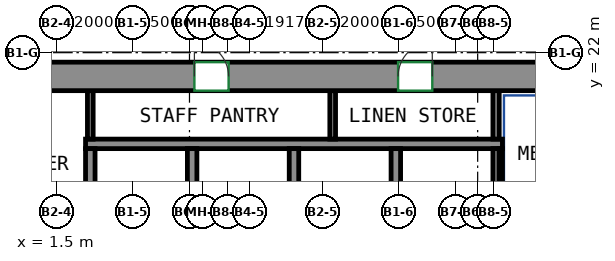
"""IFC4 building model, lengths in metres.
Left out: names, types, materials, properties, quantities, classifications, styles, units other than length and angle.
Written with IfcOpenShell. Run it as: python <this file> out.ifc"""

import sys

from ifc_helpers import new_model, si_unit, direction, frame, frame_2d, origin, place, context, subcontext, project, spatial, rectangle, extrude, source, transform, mapped, element, fill, save


model = new_model("IFC4")
c1 = context("Model", 3, precision=1e-05, world=origin(), true_north=direction((0.0, 1.0)))
c2 = subcontext(c1, "Body", "Model", "MODEL_VIEW")
j1 = project(units=[si_unit("LENGTHUNIT", "METRE"), si_unit("PLANEANGLEUNIT", "RADIAN")], contexts=[c1])
p1 = place(None, origin())
s1 = spatial("IfcSite", under=j1, at=p1, CompositionType="ELEMENT")
p2 = place(p1, origin())
s2 = spatial("IfcBuilding", under=s1, at=p2, CompositionType="ELEMENT")
p3 = place(p2, frame((0.0, 0.0, 216.9)))
s3 = spatial("IfcBuildingStorey", under=s2, at=p3, CompositionType="ELEMENT", Elevation=216.9)
m1 = source(origin(), c2, "Body", "SweptSolid", [
    extrude(rectangle(XDim=33.6, YDim=0.75, at=frame_2d((16.8, 0.0))), origin(), (0.0, 0.0, 1.0), 3.12),
])
p4 = place(p3, frame((-15.75, 21.375, 0.0), z_axis=(0.0, 0.0, 1.0), x_axis=(1.0, 0.0, 0.0)))
e1 = element("IfcWall", 1, at=p4, inside=s3, PredefinedType="SHEAR", context=c2, shape_type="MappedRepresentation", body=[
    mapped(m1, transform((0.0, 0.0, 0.0))),
])
p5 = place(p4, frame((5.858, 0.0, 0.0)))
e2 = element("IfcOpeningElement", 2, at=p5, cuts=e1, PredefinedType="OPENING", context=c2, shape_type="SweptSolid", body=[
    extrude(rectangle(XDim=0.9, YDim=2.1, at=frame_2d((0.45, 1.05))), frame((0.0, 0.385, 0.0), z_axis=(0.0, -1.0, 0.0), x_axis=(1.0, 0.0, 0.0)), (0.0, 0.0, 1.0), 0.77),
])
p6 = place(p4, frame((10.923, 0.0, 0.0)))
e3 = element("IfcOpeningElement", 3, at=p6, cuts=e1, PredefinedType="OPENING", context=c2, shape_type="SweptSolid", body=[
    extrude(rectangle(XDim=0.9, YDim=2.1, at=frame_2d((0.45, 1.05))), frame((0.0, 0.385, 0.0), z_axis=(0.0, -1.0, 0.0), x_axis=(1.0, 0.0, 0.0)), (0.0, 0.0, 1.0), 0.77),
])
p7 = place(p4, frame((16.055, 0.0, 0.0)))
e4 = element("IfcOpeningElement", 4, at=p7, cuts=e1, PredefinedType="OPENING", context=c2, shape_type="SweptSolid", body=[
    extrude(rectangle(XDim=0.9, YDim=2.1, at=frame_2d((0.45, 1.05))), frame((0.0, 0.385, 0.0), z_axis=(0.0, -1.0, 0.0), x_axis=(1.0, 0.0, 0.0)), (0.0, 0.0, 1.0), 0.77),
])
p8 = place(p4, frame((20.879, 0.0, 0.0)))
e5 = element("IfcOpeningElement", 5, at=p8, cuts=e1, PredefinedType="OPENING", context=c2, shape_type="SweptSolid", body=[
    extrude(rectangle(XDim=0.9, YDim=2.1, at=frame_2d((0.45, 1.05))), frame((0.0, 0.385, 0.0), z_axis=(0.0, -1.0, 0.0), x_axis=(1.0, 0.0, 0.0)), (0.0, 0.0, 1.0), 0.77),
])
p9 = place(p4, frame((26.239, 0.0, 0.0)))
e6 = element("IfcOpeningElement", 6, at=p9, cuts=e1, PredefinedType="OPENING", context=c2, shape_type="SweptSolid", body=[
    extrude(rectangle(XDim=0.9, YDim=2.1, at=frame_2d((0.45, 1.05))), frame((0.0, 0.385, 0.0), z_axis=(0.0, -1.0, 0.0), x_axis=(1.0, 0.0, 0.0)), (0.0, 0.0, 1.0), 0.77),
])
p10 = place(p4, frame((2.275, 0.0, 0.0)))
e7 = element("IfcOpeningElement", 7, at=p10, cuts=e1, PredefinedType="OPENING", context=c2, shape_type="SweptSolid", body=[
    extrude(rectangle(XDim=0.9, YDim=2.1, at=frame_2d((0.45, 1.05))), frame((0.0, 0.385, 0.0), z_axis=(0.0, -1.0, 0.0), x_axis=(1.0, 0.0, 0.0)), (0.0, 0.0, 1.0), 0.77),
])
p11 = place(p4, frame((30.425, 0.0, 0.0)))
e8 = element("IfcOpeningElement", 8, at=p11, cuts=e1, PredefinedType="OPENING", context=c2, shape_type="SweptSolid", body=[
    extrude(rectangle(XDim=0.9, YDim=2.1, at=frame_2d((0.45, 1.05))), frame((0.0, 0.385, 0.0), z_axis=(0.0, -1.0, 0.0), x_axis=(1.0, 0.0, 0.0)), (0.0, 0.0, 1.0), 0.77),
])
m2 = source(origin(), c2, "Body", "SweptSolid", [
    extrude(rectangle(XDim=10.97, YDim=0.25, at=frame_2d((5.485, 0.0))), origin(), (0.0, 0.0, 1.0), 3.12),
])
p12 = place(p3, frame((2.265, 19.6, 0.0), z_axis=(0.0, 0.0, 1.0), x_axis=(1.0, 0.0, 0.0)))
e9 = element("IfcWall", 9, at=p12, inside=s3, PredefinedType="PARTITIONING", context=c2, shape_type="MappedRepresentation", body=[
    mapped(m2, transform((0.0, 0.0, 0.0))),
])
m3 = source(origin(), c2, "Body", "SweptSolid", [
    extrude(rectangle(XDim=3.275, YDim=0.165, at=frame_2d((1.638, 0.0))), origin(), (0.0, 0.0, 1.0), 3.12),
])
p13 = place(p3, frame((13.067, 16.2, 0.0), z_axis=(0.0, 0.0, 1.0), x_axis=(0.0, 1.0, 0.0)))
e10 = element("IfcWall", 10, at=p13, inside=s3, PredefinedType="PARTITIONING", context=c2, shape_type="MappedRepresentation", body=[
    mapped(m3, transform((0.0, 0.0, 0.0))),
])
m4 = source(origin(), c2, "Body", "SweptSolid", [
    extrude(rectangle(XDim=1.275, YDim=0.165, at=frame_2d((0.637, 0.0))), origin(), (0.0, 0.0, 1.0), 3.12),
])
p14 = place(p3, frame((13.067, 19.725, 0.0), z_axis=(0.0, 0.0, 1.0), x_axis=(0.0, 1.0, 0.0)))
e11 = element("IfcWall", 11, at=p14, inside=s3, PredefinedType="PARTITIONING", context=c2, shape_type="MappedRepresentation", body=[
    mapped(m4, transform((0.0, 0.0, 0.0))),
])
m5 = source(origin(), c2, "Body", "SweptSolid", [
    extrude(rectangle(XDim=3.275, YDim=0.25, at=frame_2d((1.638, 0.0))), origin(), (0.0, 0.0, 1.0), 3.12),
])
p15 = place(p3, frame((10.43, 16.2, 0.0), z_axis=(0.0, 0.0, 1.0), x_axis=(0.0, 1.0, 0.0)))
e12 = element("IfcWall", 12, at=p15, inside=s3, PredefinedType="PARTITIONING", context=c2, shape_type="MappedRepresentation", body=[
    mapped(m5, transform((0.0, 0.0, 0.0))),
])
m6 = source(origin(), c2, "Body", "SweptSolid", [
    extrude(rectangle(XDim=2.725, YDim=0.085, at=frame_2d((1.363, 0.0))), origin(), (0.0, 0.0, 1.0), 3.12),
])
p16 = place(p3, frame((13.192, 16.75, 0.0), z_axis=(0.0, 0.0, 1.0), x_axis=(0.0, 1.0, 0.0)))
e13 = element("IfcWall", 13, at=p16, inside=s3, PredefinedType="PARTITIONING", context=c2, shape_type="MappedRepresentation", body=[
    mapped(m6, transform((0.0, 0.0, 0.0))),
])
for number, where, z_axis, x_axis in (
    (14, (2.39, 16.2, 0.0), (0.0, 0.0, 1.0), (0.0, 1.0, 0.0)),
    (15, (5.07, 16.2, 0.0), (0.0, 0.0, 1.0), (0.0, 1.0, 0.0)),
    (16, (7.75, 16.2, 0.0), (0.0, 0.0, 1.0), (0.0, 1.0, 0.0)),
):
    element("IfcWall", number, at=place(p3, frame(where, z_axis=z_axis, x_axis=x_axis)), inside=s3, PredefinedType="PARTITIONING", context=c2, shape_type="MappedRepresentation", body=[
        mapped(m5, transform((0.0, 0.0, 0.0))),
    ])
m7 = source(origin(), c2, "Body", "SweptSolid", [
    extrude(rectangle(XDim=1.275, YDim=0.15, at=frame_2d((0.637, 0.0))), origin(), (0.0, 0.0, 1.0), 3.12),
])
for number, where, z_axis, x_axis in (
    (17, (2.39, 19.725, 0.0), (0.0, 0.0, 1.0), (0.0, 1.0, 0.0)),
    (18, (8.768, 19.725, 0.0), (0.0, 0.0, 1.0), (0.0, 1.0, 0.0)),
):
    element("IfcWall", number, at=place(p3, frame(where, z_axis=z_axis, x_axis=x_axis)), inside=s3, PredefinedType="PARTITIONING", context=c2, shape_type="MappedRepresentation", body=[
        mapped(m7, transform((0.0, 0.0, 0.0))),
    ])
p17 = place(p8, origin())
e19 = element("IfcDoor", 19, at=p17, inside=s3, OperationType="SINGLE_SWING_LEFT", PredefinedType="DOOR", context=c2, shape_type="SweptSolid", body=[
    extrude(rectangle(XDim=0.9, YDim=2.1, at=frame_2d((0.45, 1.05))), frame((0.0, -0.23, 0.0), z_axis=(0.0, -1.0, 0.0), x_axis=(1.0, 0.0, 0.0)), (0.0, 0.0, 1.0), 0.05),
])
fill(e5, e19)
p18 = place(p9, origin())
e20 = element("IfcDoor", 20, at=p18, inside=s3, OperationType="SINGLE_SWING_RIGHT", PredefinedType="DOOR", context=c2, shape_type="SweptSolid", body=[
    extrude(rectangle(XDim=0.9, YDim=2.1, at=frame_2d((0.45, 1.05))), frame((0.0, -0.23, 0.0), z_axis=(0.0, -1.0, 0.0), x_axis=(1.0, 0.0, 0.0)), (0.0, 0.0, 1.0), 0.05),
])
fill(e6, e20)
save(model, sys.argv[1])
